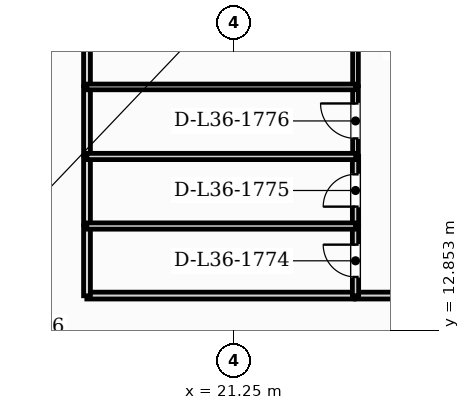
"""IFC4 building model, lengths in metres.
Left out: names, types, materials, properties, quantities, classifications, styles, units other than length and angle.
Written with IfcOpenShell. Run it as: python <this file> out.ifc"""

import sys

from ifc_helpers import new_model, si_unit, direction, frame, frame_2d, origin, place, context, subcontext, project, spatial, rectangle, extrude, element, fill, save


model = new_model("IFC4")
c1 = context("Model", 3, precision=1e-05, world=origin(), true_north=direction((0.0, 1.0)))
c2 = subcontext(c1, "Body", "Model", "MODEL_VIEW")
j1 = project(units=[si_unit("LENGTHUNIT", "METRE"), si_unit("PLANEANGLEUNIT", "RADIAN")], contexts=[c1])
p1 = place(None, origin())
s1 = spatial("IfcSite", under=j1, at=p1, CompositionType="ELEMENT")
p2 = place(p1, origin())
s2 = spatial("IfcBuilding", under=s1, at=p2, CompositionType="ELEMENT")
p3 = place(p2, frame((0.0, 0.0, 149.05)))
s3 = spatial("IfcBuildingStorey", under=s2, at=p3, CompositionType="ELEMENT", Elevation=149.05)
p4 = place(p3, frame((24.45, 13.77, 0.0), z_axis=(0.0, 0.0, 1.0), x_axis=(1.0, 0.0, 0.0)))
e1 = element("IfcWall", 1, at=p4, inside=s3, PredefinedType="PARTITIONING", context=c2, shape_type="SweptSolid", body=[
    extrude(rectangle(XDim=4.99, YDim=0.18, at=frame_2d((2.495, 0.0))), origin(), (0.0, 0.0, 1.0), 3.63),
])
p5 = place(p4, frame((1.995, 0.0, 0.0)))
e2 = element("IfcOpeningElement", 2, at=p5, cuts=e1, PredefinedType="OPENING", context=c2, shape_type="SweptSolid", body=[
    extrude(rectangle(XDim=1.0, YDim=2.15, at=frame_2d((0.5, 1.075))), frame((0.0, 0.1, 0.0), z_axis=(0.0, -1.0, 0.0), x_axis=(1.0, 0.0, 0.0)), (0.0, 0.0, 1.0), 0.2),
])
p6 = place(p3, frame((17.385, 13.77, 0.0), z_axis=(0.0, 0.0, 1.0), x_axis=(1.0, 0.0, 0.0)))
e3 = element("IfcWall", 3, at=p6, inside=s3, PredefinedType="PARTITIONING", context=c2, shape_type="SweptSolid", body=[
    extrude(rectangle(XDim=7.035, YDim=0.18, at=frame_2d((3.518, 0.0))), origin(), (0.0, 0.0, 1.0), 3.63),
])
p7 = place(p3, frame((17.39, 13.765, 0.0), z_axis=(0.0, 0.0, 1.0), x_axis=(0.0, 1.0, 0.0)))
e4 = element("IfcWall", 4, at=p7, inside=s3, PredefinedType="PARTITIONING", context=c2, shape_type="SweptSolid", body=[
    extrude(rectangle(XDim=1.84, YDim=0.18, at=frame_2d((0.92, 0.0))), origin(), (0.0, 0.0, 1.0), 3.63),
])
p8 = place(p3, frame((17.39, 15.635, 0.0), z_axis=(0.0, 0.0, 1.0), x_axis=(0.0, 1.0, 0.0)))
e5 = element("IfcWall", 5, at=p8, inside=s3, PredefinedType="PARTITIONING", context=c2, shape_type="SweptSolid", body=[
    extrude(rectangle(XDim=1.8, YDim=0.18, at=frame_2d((0.9, 0.0))), origin(), (0.0, 0.0, 1.0), 3.63),
])
p9 = place(p3, frame((17.39, 17.465, 0.0), z_axis=(0.0, 0.0, 1.0), x_axis=(0.0, 1.0, 0.0)))
e6 = element("IfcWall", 6, at=p9, inside=s3, PredefinedType="PARTITIONING", context=c2, shape_type="SweptSolid", body=[
    extrude(rectangle(XDim=1.8, YDim=0.18, at=frame_2d((0.9, 0.0))), origin(), (0.0, 0.0, 1.0), 3.63),
])
p10 = place(p3, frame((17.39, 19.295, 0.0), z_axis=(0.0, 0.0, 1.0), x_axis=(0.0, 1.0, 0.0)))
e7 = element("IfcWall", 7, at=p10, inside=s3, PredefinedType="PARTITIONING", context=c2, shape_type="SweptSolid", body=[
    extrude(rectangle(XDim=7.0, YDim=0.18, at=frame_2d((3.5, 0.0))), origin(), (0.0, 0.0, 1.0), 3.63),
])
p11 = place(p3, frame((24.455, 13.765, 0.0), z_axis=(0.0, 0.0, 1.0), x_axis=(0.0, 1.0, 0.0)))
e8 = element("IfcWall", 8, at=p11, inside=s3, PredefinedType="PLUMBINGWALL", context=c2, shape_type="SweptSolid", body=[
    extrude(rectangle(XDim=1.84, YDim=0.165, at=frame_2d((0.92, 0.0))), origin(), (0.0, 0.0, 1.0), 3.63),
])
p12 = place(p11, frame((0.495, 0.0, 0.0)))
e9 = element("IfcOpeningElement", 9, at=p12, cuts=e8, PredefinedType="OPENING", context=c2, shape_type="SweptSolid", body=[
    extrude(rectangle(XDim=0.85, YDim=2.1, at=frame_2d((0.425, 1.05))), frame((0.0, 0.093, 0.0), z_axis=(0.0, -1.0, 0.0), x_axis=(1.0, 0.0, 0.0)), (0.0, 0.0, 1.0), 0.185),
])
p13 = place(p3, frame((24.455, 15.635, 0.0), z_axis=(0.0, 0.0, 1.0), x_axis=(0.0, 1.0, 0.0)))
e10 = element("IfcWall", 10, at=p13, inside=s3, PredefinedType="PLUMBINGWALL", context=c2, shape_type="SweptSolid", body=[
    extrude(rectangle(XDim=1.8, YDim=0.165, at=frame_2d((0.9, 0.0))), origin(), (0.0, 0.0, 1.0), 3.63),
])
p14 = place(p13, frame((0.475, 0.0, 0.0)))
e11 = element("IfcOpeningElement", 11, at=p14, cuts=e10, PredefinedType="OPENING", context=c2, shape_type="SweptSolid", body=[
    extrude(rectangle(XDim=0.85, YDim=2.1, at=frame_2d((0.425, 1.05))), frame((0.0, 0.093, 0.0), z_axis=(0.0, -1.0, 0.0), x_axis=(1.0, 0.0, 0.0)), (0.0, 0.0, 1.0), 0.185),
])
p15 = place(p3, frame((24.455, 17.465, 0.0), z_axis=(0.0, 0.0, 1.0), x_axis=(0.0, 1.0, 0.0)))
e12 = element("IfcWall", 12, at=p15, inside=s3, PredefinedType="PARTITIONING", context=c2, shape_type="SweptSolid", body=[
    extrude(rectangle(XDim=1.8, YDim=0.15, at=frame_2d((0.9, 0.0))), origin(), (0.0, 0.0, 1.0), 3.63),
])
p16 = place(p15, frame((0.44, 0.0, 0.0)))
e13 = element("IfcOpeningElement", 13, at=p16, cuts=e12, PredefinedType="OPENING", context=c2, shape_type="SweptSolid", body=[
    extrude(rectangle(XDim=0.92, YDim=2.1, at=frame_2d((0.46, 1.05))), frame((0.0, 0.085, 0.0), z_axis=(0.0, -1.0, 0.0), x_axis=(1.0, 0.0, 0.0)), (0.0, 0.0, 1.0), 0.17),
])
p17 = place(p3, frame((24.455, 19.295, 0.0), z_axis=(0.0, 0.0, 1.0), x_axis=(0.0, 1.0, 0.0)))
e14 = element("IfcWall", 14, at=p17, inside=s3, PredefinedType="PARTITIONING", context=c2, shape_type="SweptSolid", body=[
    extrude(rectangle(XDim=5.386, YDim=0.15, at=frame_2d((2.693, 0.0))), origin(), (0.0, 0.0, 1.0), 3.63),
])
p18 = place(p17, frame((2.233, 0.0, 0.0)))
e15 = element("IfcOpeningElement", 15, at=p18, cuts=e14, PredefinedType="OPENING", context=c2, shape_type="SweptSolid", body=[
    extrude(rectangle(XDim=0.92, YDim=2.1, at=frame_2d((0.46, 1.05))), frame((0.0, 0.085, 0.0), z_axis=(0.0, -1.0, 0.0), x_axis=(1.0, 0.0, 0.0)), (0.0, 0.0, 1.0), 0.17),
])
for number, where, z_axis, x_axis in (
    (16, (17.385, 15.6, 0.0), (0.0, 0.0, 1.0), (1.0, 0.0, 0.0)),
    (17, (17.385, 17.43, 0.0), (0.0, 0.0, 1.0), (1.0, 0.0, 0.0)),
):
    element("IfcWall", number, at=place(p3, frame(where, z_axis=z_axis, x_axis=x_axis)), inside=s3, PredefinedType="PLUMBINGWALL", context=c2, shape_type="SweptSolid", body=[
        extrude(rectangle(XDim=7.075, YDim=0.165, at=frame_2d((3.538, 0.0))), origin(), (0.0, 0.0, 1.0), 3.63),
    ])
p19 = place(p3, frame((17.385, 19.26, 0.0), z_axis=(0.0, 0.0, 1.0), x_axis=(1.0, 0.0, 0.0)))
e18 = element("IfcWall", 18, at=p19, inside=s3, PredefinedType="PARTITIONING", context=c2, shape_type="SweptSolid", body=[
    extrude(rectangle(XDim=7.075, YDim=0.15, at=frame_2d((3.538, 0.0))), origin(), (0.0, 0.0, 1.0), 3.63),
])
p20 = place(p12, origin())
e19 = element("IfcDoor", 19, at=p20, inside=s3, OperationType="SINGLE_SWING_RIGHT", PredefinedType="DOOR", context=c2, shape_type="SweptSolid", body=[
    extrude(rectangle(XDim=0.85, YDim=2.1, at=frame_2d((0.425, 1.05))), frame((0.0, 0.025, 0.0), z_axis=(0.0, -1.0, 0.0), x_axis=(1.0, 0.0, 0.0)), (0.0, 0.0, 1.0), 0.05),
])
fill(e9, e19)
p21 = place(p14, origin())
e20 = element("IfcDoor", 20, at=p21, inside=s3, OperationType="SINGLE_SWING_LEFT", PredefinedType="DOOR", context=c2, shape_type="SweptSolid", body=[
    extrude(rectangle(XDim=0.85, YDim=2.1, at=frame_2d((0.425, 1.05))), frame((0.0, 0.025, 0.0), z_axis=(0.0, -1.0, 0.0), x_axis=(1.0, 0.0, 0.0)), (0.0, 0.0, 1.0), 0.05),
])
fill(e11, e20)
p22 = place(p16, origin())
e21 = element("IfcDoor", 21, at=p22, inside=s3, OperationType="SINGLE_SWING_RIGHT", PredefinedType="DOOR", context=c2, shape_type="SweptSolid", body=[
    extrude(rectangle(XDim=0.92, YDim=2.1, at=frame_2d((0.46, 1.05))), frame((0.0, 0.025, 0.0), z_axis=(0.0, -1.0, 0.0), x_axis=(1.0, 0.0, 0.0)), (0.0, 0.0, 1.0), 0.05),
])
fill(e13, e21)
save(model, sys.argv[1])
